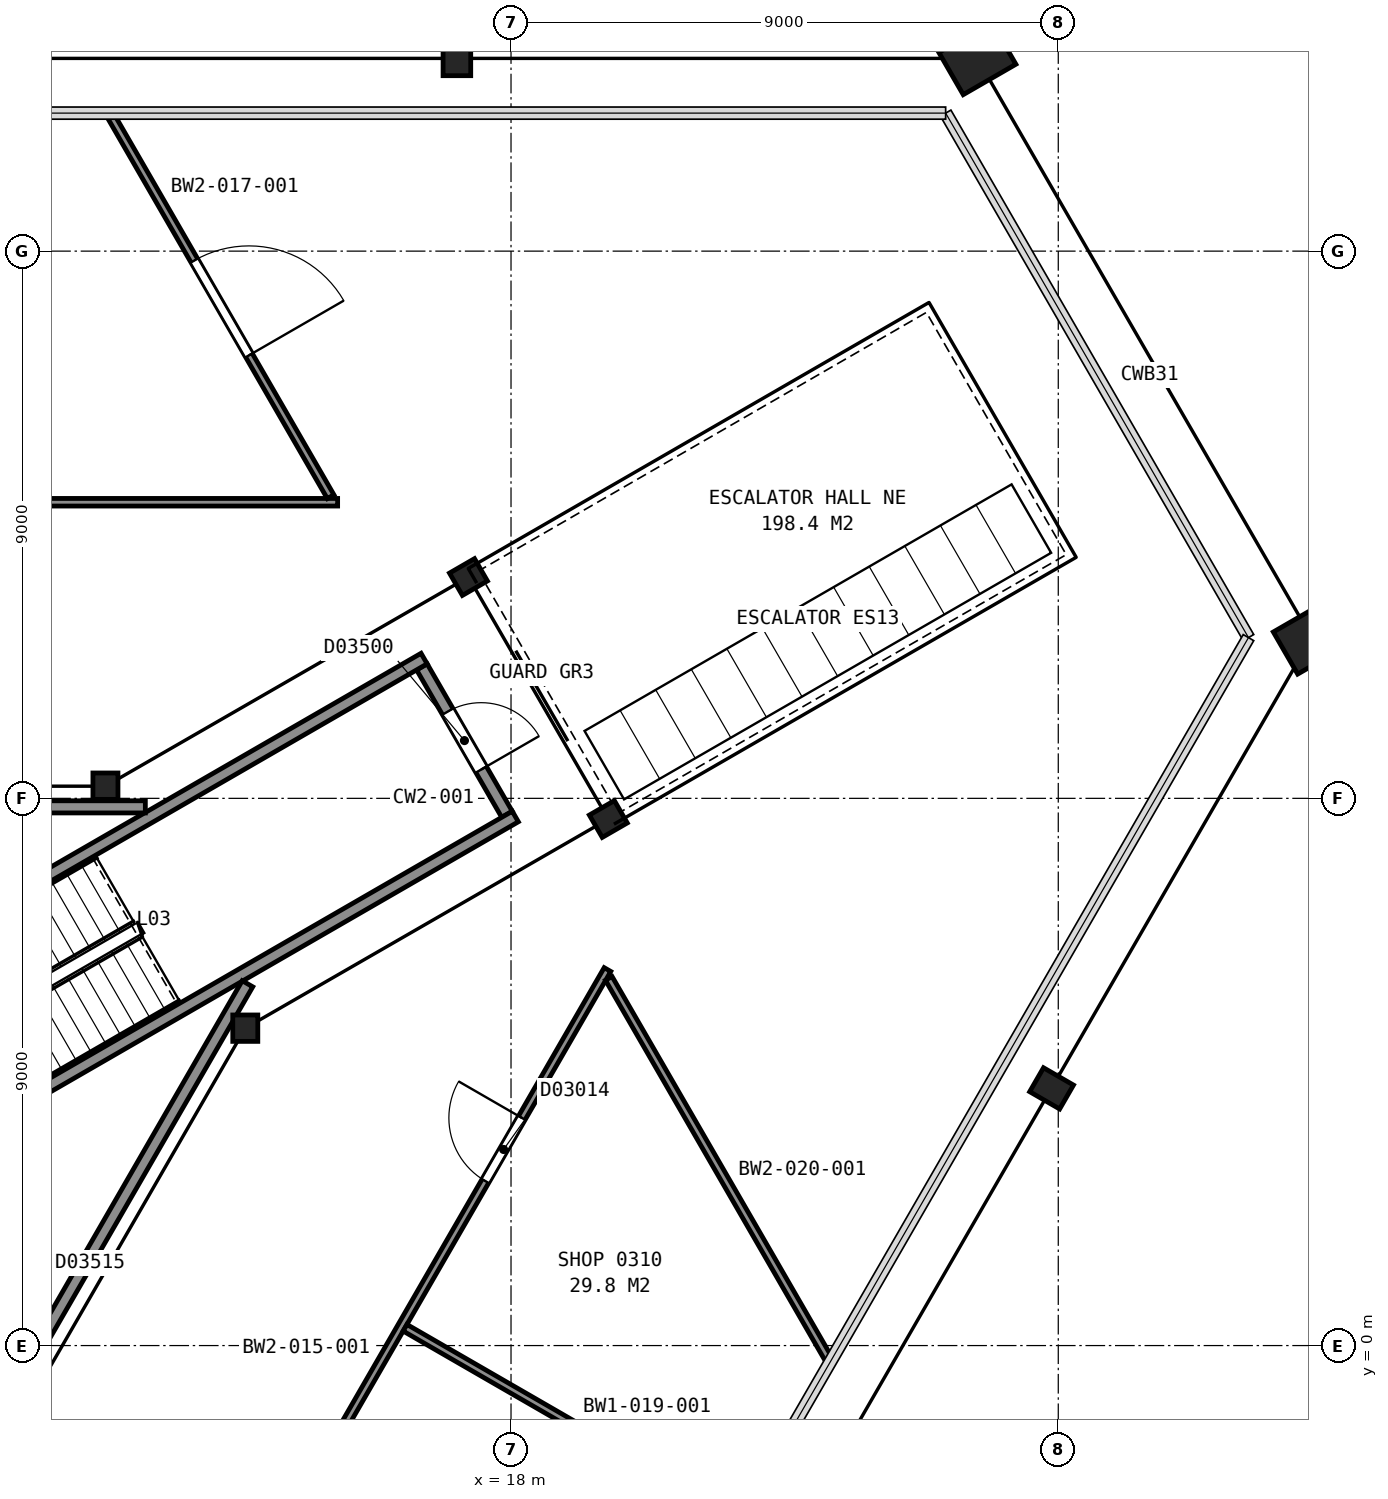
"""IFC4 building model, lengths in metres.
Left out: names, types, materials, properties, quantities, classifications, styles, units other than length and angle.
Written with IfcOpenShell. Run it as: python <this file> out.ifc"""

import sys

from ifc_helpers import new_model, si_unit, direction, frame, frame_2d, origin, origin_2d, place, context, subcontext, project, spatial, rectangle, hollow_rectangle, i_section, extrude, element, fill, save


model = new_model("IFC4")
c1 = context("Model", 3, precision=1e-05, world=origin(), true_north=direction((0.0, 1.0)))
c2 = subcontext(c1, "Body", "Model", "MODEL_VIEW")
j1 = project(units=[si_unit("LENGTHUNIT", "METRE"), si_unit("PLANEANGLEUNIT", "RADIAN")], contexts=[c1])
p1 = place(None, origin())
s1 = spatial("IfcSite", under=j1, at=p1, CompositionType="ELEMENT")
p2 = place(p1, origin())
s2 = spatial("IfcBuilding", under=s1, at=p2, CompositionType="ELEMENT")
p3 = place(p2, frame((0.0, 0.0, 22.4)))
s3 = spatial("IfcBuildingStorey", under=s2, at=p3, CompositionType="ELEMENT", Elevation=22.4)
p4 = place(p3, frame((25.67, 21.17, 0.0), z_axis=(0.0, 0.0, 1.0), x_axis=(0.5, -0.866025403784, 0.0)))
e1 = element("IfcColumn", 1, at=p4, inside=s3, PredefinedType="COLUMN", context=c2, shape_type="SweptSolid", body=[
    extrude(hollow_rectangle(XDim=0.8, YDim=1.0, WallThickness=0.075, at=origin_2d()), origin(), (0.0, 0.0, 1.0), 4.8),
])
for number, where, z_axis, x_axis in (
    (2, (17.11, 21.17, 0.0), (0.0, 0.0, 1.0), (1.0, 0.0, 0.0)),
    (3, (26.89, 4.23, 0.0), (0.0, 0.0, 1.0), (-0.5, -0.866, 0.0)),
):
    element("IfcColumn", number, at=place(p3, frame(where, z_axis=z_axis, x_axis=x_axis)), inside=s3, PredefinedType="COLUMN", context=c2, shape_type="SweptSolid", body=[
        extrude(i_section(OverallWidth=0.455, OverallDepth=0.569, WebThickness=0.078, FlangeThickness=0.125, FilletRadius=0.015, at=origin_2d()), origin(), (0.0, 0.0, 1.0), 4.8),
    ])
p5 = place(p3, frame((31.17, 11.64, 0.0), z_axis=(0.0, 0.0, 1.0), x_axis=(0.5, -0.866025403784, 0.0)))
e4 = element("IfcColumn", 4, at=p5, inside=s3, PredefinedType="COLUMN", context=c2, shape_type="SweptSolid", body=[
    extrude(hollow_rectangle(XDim=0.8, YDim=1.0, WallThickness=0.075, at=origin_2d()), origin(), (0.0, 0.0, 1.0), 4.8),
])
p6 = place(p3, frame((13.63, 5.22, 0.0), z_axis=(0.0, 0.0, 1.0), x_axis=(1.0, 0.0, 0.0)))
e5 = element("IfcColumn", 5, at=p6, inside=s3, PredefinedType="COLUMN", context=c2, shape_type="SweptSolid", body=[
    extrude(i_section(OverallWidth=0.411, OverallDepth=0.434, WebThickness=0.036, FlangeThickness=0.057, FilletRadius=0.015, at=origin_2d()), origin(), (0.0, 0.0, 1.0), 4.8),
])
for number, where, z_axis, x_axis in (
    (6, (19.6, 8.66, 0.0), (0.0, 0.0, 1.0), (0.5, -0.866, 0.0)),
    (7, (17.3, 12.64, 0.0), (0.0, 0.0, 1.0), (0.5, -0.866, 0.0)),
):
    element("IfcColumn", number, at=place(p3, frame(where, z_axis=z_axis, x_axis=x_axis)), inside=s3, PredefinedType="COLUMN", context=c2, shape_type="SweptSolid", body=[
        extrude(i_section(OverallWidth=0.424, OverallDepth=0.475, WebThickness=0.048, FlangeThickness=0.077, FilletRadius=0.015, at=origin_2d()), origin(), (0.0, 0.0, 1.0), 4.8),
    ])
p7 = place(p3, frame((11.33, 9.2, 0.0), z_axis=(0.0, 0.0, 1.0), x_axis=(1.0, 0.0, 0.0)))
e8 = element("IfcColumn", 8, at=p7, inside=s3, PredefinedType="COLUMN", context=c2, shape_type="SweptSolid", body=[
    extrude(i_section(OverallWidth=0.411, OverallDepth=0.434, WebThickness=0.036, FlangeThickness=0.057, FilletRadius=0.015, at=origin_2d()), origin(), (0.0, 0.0, 1.0), 4.8),
])
p8 = place(p3, frame((17.934, 8.738, 0.0), z_axis=(0.0, 0.0, 1.0), x_axis=(-0.49998411664, 0.866034573852, 0.0)))
e9 = element("IfcWall", 9, at=p8, inside=s3, PredefinedType="PARTITIONING", context=c2, shape_type="SweptSolid", body=[
    extrude(rectangle(XDim=2.8, YDim=0.2, at=frame_2d((1.4, 0.0))), origin(), (0.0, 0.0, 1.0), 4.55),
])
p9 = place(p8, frame((0.85, 0.0, 0.0)))
e10 = element("IfcOpeningElement", 10, at=p9, cuts=e9, PredefinedType="OPENING", context=c2, shape_type="SweptSolid", body=[
    extrude(rectangle(XDim=1.1, YDim=2.1, at=frame_2d((0.55, 1.05))), frame((0.0, 0.11, 0.0), z_axis=(0.0, -1.0, 0.0), x_axis=(1.0, 0.0, 0.0)), (0.0, 0.0, 1.0), 0.22),
])
for number, where, z_axis, x_axis in (
    (11, (6.178, 5.299, 0.0), (0.0, 0.0, 1.0), (0.866, 0.5, 0.0)),
    (12, (7.678, 2.701, 0.0), (0.0, 0.0, 1.0), (0.866, 0.5, 0.0)),
):
    element("IfcWall", number, at=place(p3, frame(where, z_axis=z_axis, x_axis=x_axis)), inside=s3, PredefinedType="PARTITIONING", context=c2, shape_type="SweptSolid", body=[
        extrude(rectangle(XDim=12.0, YDim=0.2, at=frame_2d((6.0, 0.0))), origin(), (0.0, 0.0, 1.0), 4.55),
    ])
p10 = place(p3, frame((11.986, 8.86, 0.0), z_axis=(0.0, 0.0, 1.0), x_axis=(-1.0, 0.0, 0.0)))
e13 = element("IfcWall", 13, at=p10, inside=s3, PredefinedType="PARTITIONING", context=c2, shape_type="SweptSolid", body=[
    extrude(rectangle(XDim=23.967, YDim=0.2, at=frame_2d((11.983, 0.0))), origin(), (0.0, 0.0, 1.0), 4.55),
])
p11 = place(p10, frame((7.596, 0.0, 0.0)))
e14 = element("IfcOpeningElement", 14, at=p11, cuts=e13, PredefinedType="OPENING", context=c2, shape_type="SweptSolid", body=[
    extrude(rectangle(XDim=1.8, YDim=2.1, at=frame_2d((0.9, 1.05))), frame((0.0, 0.11, 0.0), z_axis=(0.0, -1.0, 0.0), x_axis=(1.0, 0.0, 0.0)), (0.0, 0.0, 1.0), 0.22),
])
p12 = place(p3, frame((3.403, -11.826, 0.0), z_axis=(0.0, 0.0, 1.0), x_axis=(0.499990831429, 0.866030697196, 0.0)))
e15 = element("IfcWall", 15, at=p12, inside=s3, PredefinedType="PARTITIONING", context=c2, shape_type="SweptSolid", body=[
    extrude(rectangle(XDim=20.526, YDim=0.2, at=frame_2d((10.263, 0.0))), origin(), (0.0, 0.0, 1.0), 4.55),
])
p13 = place(p12, frame((10.0, 0.0, 0.0)))
e16 = element("IfcOpeningElement", 16, at=p13, cuts=e15, PredefinedType="OPENING", context=c2, shape_type="SweptSolid", body=[
    extrude(rectangle(XDim=1.8, YDim=2.1, at=frame_2d((0.9, 1.05))), frame((0.0, 0.11, 0.0), z_axis=(0.0, -1.0, 0.0), x_axis=(1.0, 0.0, 0.0)), (0.0, 0.0, 1.0), 0.22),
])
p14 = place(p3, frame((-15.148, 13.87, 0.0), z_axis=(0.0, 0.0, 1.0), x_axis=(1.0, 0.0, 0.0)))
e17 = element("IfcWall", 17, at=p14, inside=s3, PredefinedType="PARTITIONING", context=c2, shape_type="SweptSolid", body=[
    extrude(rectangle(XDim=30.297, YDim=0.125, at=frame_2d((15.148, 0.0))), origin(), (0.0, 0.0, 1.0), 3.653),
])
p15 = place(p14, frame((10.466, 0.0, 0.0)))
e18 = element("IfcOpeningElement", 18, at=p15, cuts=e17, PredefinedType="OPENING", context=c2, shape_type="SweptSolid", body=[
    extrude(rectangle(XDim=1.0, YDim=2.1, at=frame_2d((0.5, 1.05))), frame((0.0, 0.073, 0.0), z_axis=(0.0, -1.0, 0.0), x_axis=(1.0, 0.0, 0.0)), (0.0, 0.0, 1.0), 0.145),
])
p16 = place(p14, frame((2.812, 0.0, 0.0)))
e19 = element("IfcOpeningElement", 19, at=p16, cuts=e17, PredefinedType="OPENING", context=c2, shape_type="SweptSolid", body=[
    extrude(rectangle(XDim=1.2, YDim=2.1, at=frame_2d((0.6, 1.05))), frame((0.0, 0.073, 0.0), z_axis=(0.0, -1.0, 0.0), x_axis=(1.0, 0.0, 0.0)), (0.0, 0.0, 1.0), 0.145),
])
p17 = place(p3, frame((19.586, 6.184, 0.0), z_axis=(0.0, 0.0, 1.0), x_axis=(-0.499994028088, -0.866028851642, 0.0)))
e20 = element("IfcWall", 20, at=p17, inside=s3, PredefinedType="PARTITIONING", context=c2, shape_type="SweptSolid", body=[
    extrude(rectangle(XDim=30.297, YDim=0.125, at=frame_2d((15.148, 0.0))), origin(), (0.0, 0.0, 1.0), 3.653),
])
p18 = place(p17, frame((23.885, 0.0, 0.0)))
e21 = element("IfcOpeningElement", 21, at=p18, cuts=e20, PredefinedType="OPENING", context=c2, shape_type="SweptSolid", body=[
    extrude(rectangle(XDim=1.8, YDim=2.4, at=frame_2d((0.9, 1.2))), frame((0.0, 0.073, 0.0), z_axis=(0.0, -1.0, 0.0), x_axis=(1.0, 0.0, 0.0)), (0.0, 0.0, 1.0), 0.145),
])
p19 = place(p17, frame((16.741, 0.0, 0.0)))
e22 = element("IfcOpeningElement", 22, at=p19, cuts=e20, PredefinedType="OPENING", context=c2, shape_type="SweptSolid", body=[
    extrude(rectangle(XDim=1.0, YDim=2.1, at=frame_2d((0.5, 1.05))), frame((0.0, 0.073, 0.0), z_axis=(0.0, -1.0, 0.0), x_axis=(1.0, 0.0, 0.0)), (0.0, 0.0, 1.0), 0.145),
])
p20 = place(p17, frame((10.349, 0.0, 0.0)))
e23 = element("IfcOpeningElement", 23, at=p20, cuts=e20, PredefinedType="OPENING", context=c2, shape_type="SweptSolid", body=[
    extrude(rectangle(XDim=1.2, YDim=2.1, at=frame_2d((0.6, 1.05))), frame((0.0, 0.073, 0.0), z_axis=(0.0, -1.0, 0.0), x_axis=(1.0, 0.0, 0.0)), (0.0, 0.0, 1.0), 0.145),
])
p21 = place(p17, frame((2.817, 0.0, 0.0)))
e24 = element("IfcOpeningElement", 24, at=p21, cuts=e20, PredefinedType="OPENING", context=c2, shape_type="SweptSolid", body=[
    extrude(rectangle(XDim=1.2, YDim=2.1, at=frame_2d((0.6, 1.05))), frame((0.0, 0.073, 0.0), z_axis=(0.0, -1.0, 0.0), x_axis=(1.0, 0.0, 0.0)), (0.0, 0.0, 1.0), 0.145),
])
p22 = place(p3, frame((15.033, 13.961, 0.0), z_axis=(0.0, 0.0, 1.0), x_axis=(-0.499977739203, 0.86603825568, 0.0)))
e25 = element("IfcWall", 25, at=p22, inside=s3, PredefinedType="PARTITIONING", context=c2, shape_type="SweptSolid", body=[
    extrude(rectangle(XDim=7.285, YDim=0.125, at=frame_2d((3.643, 0.0))), origin(), (0.0, 0.0, 1.0), 4.64),
])
p23 = place(p22, frame((2.685, 0.0, 0.0)))
e26 = element("IfcOpeningElement", 26, at=p23, cuts=e25, PredefinedType="OPENING", context=c2, shape_type="SweptSolid", body=[
    extrude(rectangle(XDim=1.8, YDim=2.4, at=frame_2d((0.9, 1.2))), frame((0.0, 0.073, 0.0), z_axis=(0.0, -1.0, 0.0), x_axis=(1.0, 0.0, 0.0)), (0.0, 0.0, 1.0), 0.145),
])
p24 = place(p3, frame((16.257, 0.293, 0.0), z_axis=(0.0, 0.0, 1.0), x_axis=(0.866118237319, -0.499839173118, 0.0)))
e27 = element("IfcWall", 27, at=p24, inside=s3, PredefinedType="PARTITIONING", context=c2, shape_type="SweptSolid", body=[
    extrude(rectangle(XDim=6.337, YDim=0.125, at=frame_2d((3.169, 0.0))), origin(), (0.0, 0.0, 1.0), 3.653),
])
p25 = place(p3, frame((19.607, 6.039, 0.0), z_axis=(0.0, 0.0, 1.0), x_axis=(0.500002873931, -0.866023744513, 0.0)))
e28 = element("IfcWall", 28, at=p25, inside=s3, PredefinedType="PARTITIONING", context=c2, shape_type="SweptSolid", body=[
    extrude(rectangle(XDim=7.285, YDim=0.125, at=frame_2d((3.643, 0.0))), origin(), (0.0, 0.0, 1.0), 4.64),
])
p26 = place(p9, origin())
e29 = element("IfcDoor", 29, at=p26, inside=s3, OperationType="SINGLE_SWING_LEFT", PredefinedType="DOOR", context=c2, shape_type="SweptSolid", body=[
    extrude(rectangle(XDim=1.1, YDim=2.1, at=frame_2d((0.55, 1.05))), frame((0.0, 0.025, 0.0), z_axis=(0.0, -1.0, 0.0), x_axis=(1.0, 0.0, 0.0)), (0.0, 0.0, 1.0), 0.05),
])
fill(e10, e29)
p27 = place(p21, origin())
e30 = element("IfcDoor", 30, at=p27, inside=s3, OperationType="SINGLE_SWING_LEFT", PredefinedType="DOOR", context=c2, shape_type="SweptSolid", body=[
    extrude(rectangle(XDim=1.2, YDim=2.1, at=frame_2d((0.6, 1.05))), frame((0.0, 0.025, 0.0), z_axis=(0.0, -1.0, 0.0), x_axis=(1.0, 0.0, 0.0)), (0.0, 0.0, 1.0), 0.05),
])
fill(e24, e30)
p28 = place(p23, origin())
e31 = element("IfcDoor", 31, at=p28, inside=s3, OperationType="DOUBLE_DOOR_SINGLE_SWING", PredefinedType="DOOR", context=c2, shape_type="SweptSolid", body=[
    extrude(rectangle(XDim=1.8, YDim=2.4, at=frame_2d((0.9, 1.2))), frame((0.0, 0.025, 0.0), z_axis=(0.0, -1.0, 0.0), x_axis=(1.0, 0.0, 0.0)), (0.0, 0.0, 1.0), 0.05),
])
fill(e26, e31)
save(model, sys.argv[1])
